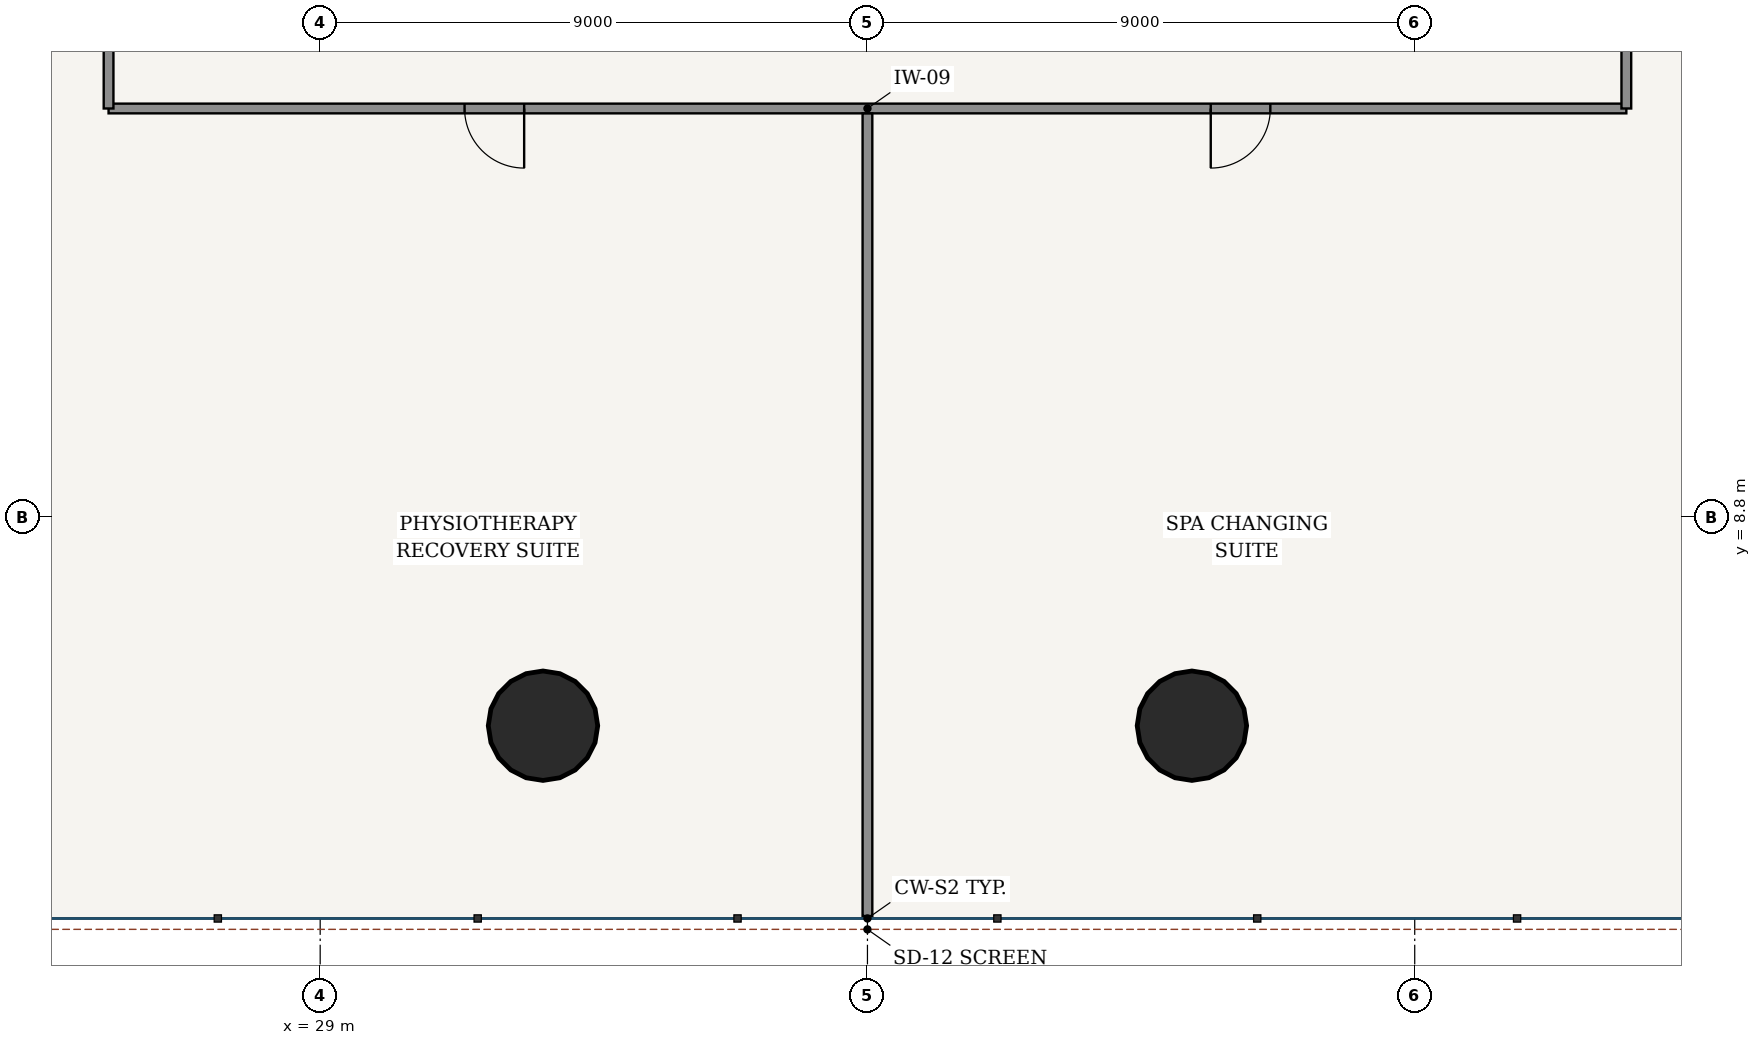
"""IFC4 building model, lengths in metres.
Left out: names, types, materials, properties, quantities, classifications, styles, units other than length and angle.
Written with IfcOpenShell. Run it as: python <this file> out.ifc"""

import sys

from ifc_helpers import new_model, si_unit, direction, frame, frame_2d, origin, origin_2d, place, context, subcontext, project, spatial, rectangle, hollow_circle, extrude, source, transform, mapped, element, fill, save


model = new_model("IFC4")
c1 = context("Model", 3, precision=1e-05, world=origin(), true_north=direction((-0.2419218956, 0.970295726276)))
c2 = subcontext(c1, "Body", "Model", "MODEL_VIEW")
j1 = project(units=[si_unit("LENGTHUNIT", "METRE"), si_unit("PLANEANGLEUNIT", "RADIAN")], contexts=[c1])
p1 = place(None, origin())
s1 = spatial("IfcSite", under=j1, at=p1, CompositionType="ELEMENT")
p2 = place(p1, origin())
s2 = spatial("IfcBuilding", under=s1, at=p2, CompositionType="ELEMENT")
p3 = place(p2, frame((0.0, 0.0, 14.4)))
s3 = spatial("IfcBuildingStorey", under=s2, at=p3, CompositionType="ELEMENT", Elevation=14.4)
for number, where, z_axis, x_axis in (
    (1, (32.664, 5.37, 0.0), (0.0, 0.0, 1.0), (1.0, 0.0, 0.0)),
    (2, (43.336, 5.37, 0.0), (0.0, 0.0, 1.0), (1.0, 0.0, 0.0)),
):
    element("IfcColumn", number, at=place(p3, frame(where, z_axis=z_axis, x_axis=x_axis)), inside=s3, PredefinedType="COLUMN", context=c2, shape_type="SweptSolid", body=[
        extrude(hollow_circle(Radius=0.9, WallThickness=0.055, at=origin_2d()), origin(), (0.0, 0.0, 1.0), 4.5),
    ])
p4 = place(p3, frame((25.52, 15.52, 0.0), z_axis=(0.0, 0.0, 1.0), x_axis=(1.0, 0.0, 0.0)))
e3 = element("IfcWall", 3, at=p4, inside=s3, PredefinedType="PARTITIONING", context=c2, shape_type="SweptSolid", body=[
    extrude(rectangle(XDim=24.96, YDim=0.16, at=frame_2d((12.48, 0.0))), origin(), (0.0, 0.0, 1.0), 3.4),
])
p5 = place(p4, frame((5.854, 0.0, 0.0)))
e4 = element("IfcOpeningElement", 4, at=p5, cuts=e3, PredefinedType="OPENING", context=c2, shape_type="SweptSolid", body=[
    extrude(rectangle(XDim=0.98, YDim=2.2, at=frame_2d((0.49, 1.1))), frame((0.0, 0.09, 0.0), z_axis=(0.0, -1.0, 0.0), x_axis=(1.0, 0.0, 0.0)), (0.0, 0.0, 1.0), 0.18),
])
p6 = place(p4, frame((18.125, 0.0, 0.0)))
e5 = element("IfcOpeningElement", 5, at=p6, cuts=e3, PredefinedType="OPENING", context=c2, shape_type="SweptSolid", body=[
    extrude(rectangle(XDim=0.98, YDim=2.2, at=frame_2d((0.49, 1.1))), frame((0.0, 0.09, 0.0), z_axis=(0.0, -1.0, 0.0), x_axis=(1.0, 0.0, 0.0)), (0.0, 0.0, 1.0), 0.18),
])
p7 = place(p3, frame((25.52, 15.52, 0.0), z_axis=(0.0, 0.0, 1.0), x_axis=(0.0, 1.0, 0.0)))
e6 = element("IfcWall", 6, at=p7, inside=s3, PredefinedType="PARTITIONING", context=c2, shape_type="SweptSolid", body=[
    extrude(rectangle(XDim=21.56, YDim=0.16, at=frame_2d((10.78, 0.0))), origin(), (0.0, 0.0, 1.0), 3.4),
])
p8 = place(p7, frame((5.254, 0.0, 0.0)))
e7 = element("IfcOpeningElement", 7, at=p8, cuts=e6, PredefinedType="OPENING", context=c2, shape_type="SweptSolid", body=[
    extrude(rectangle(XDim=0.98, YDim=2.2, at=frame_2d((0.49, 1.1))), frame((0.0, 0.09, 0.0), z_axis=(0.0, -1.0, 0.0), x_axis=(1.0, 0.0, 0.0)), (0.0, 0.0, 1.0), 0.18),
])
p9 = place(p3, frame((50.48, 15.52, 0.0), z_axis=(0.0, 0.0, 1.0), x_axis=(0.0, 1.0, 0.0)))
e8 = element("IfcWall", 8, at=p9, inside=s3, PredefinedType="PARTITIONING", context=c2, shape_type="SweptSolid", body=[
    extrude(rectangle(XDim=21.56, YDim=0.16, at=frame_2d((10.78, 0.0))), origin(), (0.0, 0.0, 1.0), 3.4),
])
p10 = place(p9, frame((5.254, 0.0, 0.0)))
e9 = element("IfcOpeningElement", 9, at=p10, cuts=e8, PredefinedType="OPENING", context=c2, shape_type="SweptSolid", body=[
    extrude(rectangle(XDim=0.98, YDim=2.2, at=frame_2d((0.49, 1.1))), frame((0.0, 0.09, 0.0), z_axis=(0.0, -1.0, 0.0), x_axis=(1.0, 0.0, 0.0)), (0.0, 0.0, 1.0), 0.18),
])
p11 = place(p3, frame((38.0, 2.24, 0.0), z_axis=(0.0, 0.0, 1.0), x_axis=(0.0, 1.0, 0.0)))
e10 = element("IfcWall", 10, at=p11, inside=s3, PredefinedType="PARTITIONING", context=c2, shape_type="SweptSolid", body=[
    extrude(rectangle(XDim=13.198, YDim=0.16, at=frame_2d((6.599, 0.0))), origin(), (0.0, 0.0, 1.0), 3.492),
])
m1 = source(origin(), c2, "Body", "SweptSolid", [
    extrude(rectangle(XDim=0.98, YDim=2.2, at=frame_2d((0.49, 1.1))), frame((0.0, 0.025, 0.0), z_axis=(0.0, -1.0, 0.0), x_axis=(1.0, 0.0, 0.0)), (0.0, 0.0, 1.0), 0.05),
])
p12 = place(p5, frame((0.98, 0.0, 0.0), z_axis=(0.0, 0.0, 1.0), x_axis=(-1.0, 0.0, 0.0)))
e11 = element("IfcDoor", 11, at=p12, inside=s3, OperationType="SINGLE_SWING_LEFT", PredefinedType="DOOR", context=c2, shape_type="MappedRepresentation", body=[
    mapped(m1, transform((0.0, 0.0, 0.0), scale=1.0)),
])
fill(e4, e11)
p13 = place(p6, frame((0.98, 0.0, 0.0), z_axis=(0.0, 0.0, 1.0), x_axis=(-1.0, 0.0, 0.0)))
e12 = element("IfcDoor", 12, at=p13, inside=s3, OperationType="SINGLE_SWING_RIGHT", PredefinedType="DOOR", context=c2, shape_type="MappedRepresentation", body=[
    mapped(m1, transform((0.0, 0.0, 0.0), scale=1.0)),
])
fill(e5, e12)
save(model, sys.argv[1])
